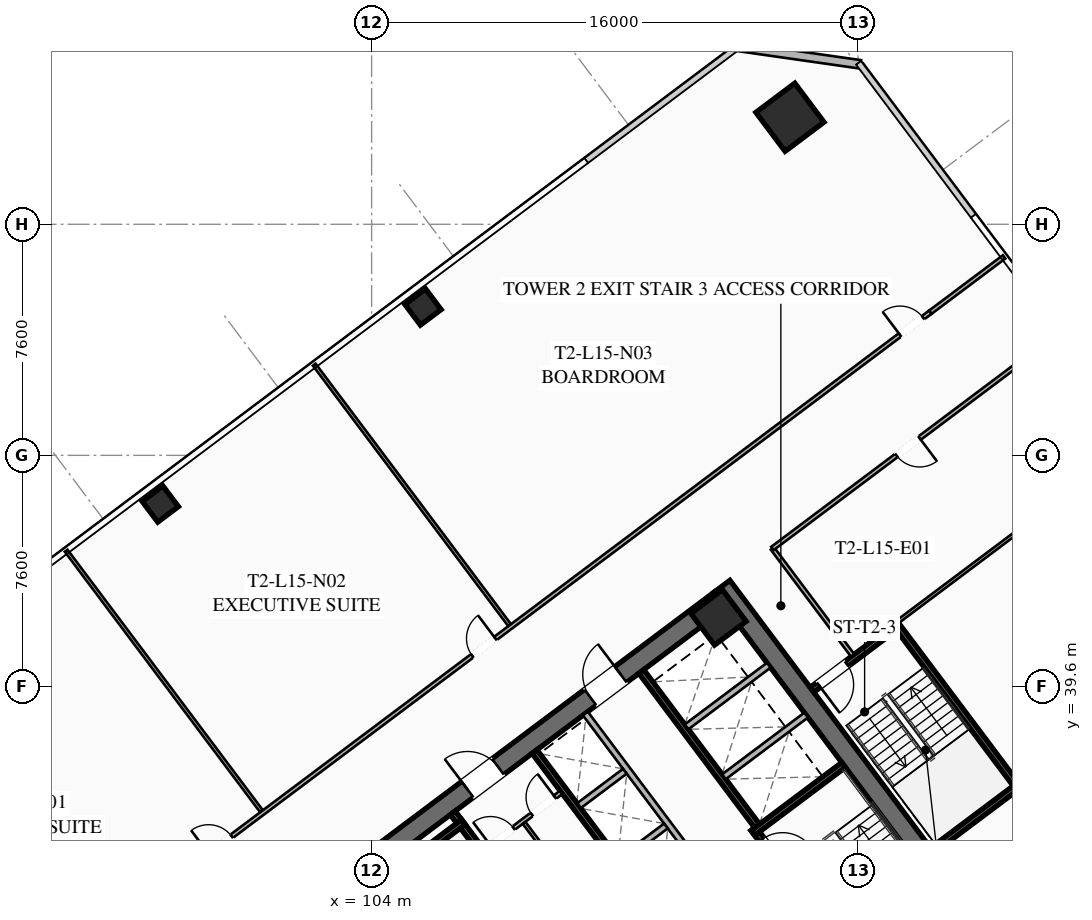
"""IFC4 building model, lengths in metres.
Left out: names, types, materials, properties, quantities, classifications, styles, units other than length and angle.
Written with IfcOpenShell. Run it as: python <this file> out.ifc"""

import sys

from ifc_helpers import new_model, si_unit, direction, frame, frame_2d, origin, origin_2d, place, context, subcontext, project, spatial, rectangle, hollow_rectangle, extrude, element, fill, save


model = new_model("IFC4")
c1 = context("Model", 3, precision=1e-05, world=origin(), true_north=direction((0.0, 1.0)))
c2 = subcontext(c1, "Body", "Model", "MODEL_VIEW")
j1 = project(units=[si_unit("LENGTHUNIT", "METRE"), si_unit("PLANEANGLEUNIT", "RADIAN")], contexts=[c1])
p1 = place(None, origin())
s1 = spatial("IfcSite", under=j1, at=p1, CompositionType="ELEMENT")
p2 = place(p1, origin())
s2 = spatial("IfcBuilding", under=s1, at=p2, CompositionType="ELEMENT")
p3 = place(p2, frame((0.0, 0.0, 60.1)))
s3 = spatial("IfcBuildingStorey", under=s2, at=p3, CompositionType="ELEMENT", Elevation=60.1)
p4 = place(p3, frame((115.524, 42.893, 0.0), z_axis=(0.0, 0.0, 1.0), x_axis=(0.600005007985, -0.799996243986, 0.0)))
e1 = element("IfcWall", 1, at=p4, inside=s3, PredefinedType="SHEAR", context=c2, shape_type="SweptSolid", body=[
    extrude(rectangle(XDim=15.6, YDim=0.65, at=frame_2d((7.8, 0.0))), origin(), (0.0, 0.0, 1.0), 3.55),
])
p5 = place(p3, frame((103.571, 33.522, 0.0), z_axis=(0.0, 0.0, 1.0), x_axis=(0.799998028465, 0.600002628705, 0.0)))
e2 = element("IfcWall", 2, at=p5, inside=s3, PredefinedType="SHEAR", context=c2, shape_type="SweptSolid", body=[
    extrude(rectangle(XDim=14.86, YDim=0.65, at=frame_2d((7.43, 0.0))), origin(), (0.0, 0.0, 1.0), 3.55),
])
p6 = place(p5, frame((4.48, 0.0, 0.0)))
e3 = element("IfcOpeningElement", 3, at=p6, cuts=e2, PredefinedType="OPENING", context=c2, shape_type="SweptSolid", body=[
    extrude(rectangle(XDim=1.25, YDim=2.25, at=frame_2d((0.625, 1.125))), frame((0.0, 0.335, 0.0), z_axis=(0.0, -1.0, 0.0), x_axis=(1.0, 0.0, 0.0)), (0.0, 0.0, 1.0), 0.67),
])
p7 = place(p5, frame((9.53, 0.0, 0.0)))
e4 = element("IfcOpeningElement", 4, at=p7, cuts=e2, PredefinedType="OPENING", context=c2, shape_type="SweptSolid", body=[
    extrude(rectangle(XDim=1.25, YDim=2.25, at=frame_2d((0.625, 1.125))), frame((0.0, 0.335, 0.0), z_axis=(0.0, -1.0, 0.0), x_axis=(1.0, 0.0, 0.0)), (0.0, 0.0, 1.0), 0.67),
])
p8 = place(p3, frame((115.41, 41.87, 0.0), z_axis=(0.0, 0.0, 1.0), x_axis=(0.799999996291, 0.600000004945, 0.0)))
e5 = element("IfcColumn", 5, at=p8, inside=s3, PredefinedType="COLUMN", context=c2, shape_type="SweptSolid", body=[
    extrude(hollow_rectangle(XDim=1.3, YDim=1.3, WallThickness=0.05, at=origin_2d()), origin(), (0.0, 0.0, 1.0), 3.35),
])
p9 = place(p3, frame((117.76, 58.32, 0.0), z_axis=(0.0, 0.0, 1.0), x_axis=(0.799999996291, 0.600000004945, 0.0)))
e6 = element("IfcColumn", 6, at=p9, inside=s3, PredefinedType="COLUMN", context=c2, shape_type="SweptSolid", body=[
    extrude(hollow_rectangle(XDim=1.6, YDim=1.6, WallThickness=0.06, at=origin_2d()), origin(), (0.0, 0.0, 1.0), 3.35),
])
for number, where, z_axis, x_axis in (
    (7, (105.69, 52.08, 0.0), (0.0, 0.0, 1.0), (0.8, 0.6, 0.0)),
    (8, (97.05, 45.6, 0.0), (0.0, 0.0, 1.0), (0.8, 0.6, 0.0)),
):
    element("IfcColumn", number, at=place(p3, frame(where, z_axis=z_axis, x_axis=x_axis)), inside=s3, PredefinedType="COLUMN", context=c2, shape_type="SweptSolid", body=[
        extrude(hollow_rectangle(XDim=0.85, YDim=0.85, WallThickness=0.035, at=origin_2d()), origin(), (0.0, 0.0, 1.0), 3.35),
    ])
p10 = place(p3, frame((116.02, 60.64, 0.0), z_axis=(0.0, 0.0, 1.0), x_axis=(0.989955445613, -0.14137968631, 0.0)))
e9 = element("IfcWall", 9, at=p10, inside=s3, PredefinedType="SOLIDWALL", context=c2, shape_type="SweptSolid", body=[
    extrude(rectangle(XDim=4.101, YDim=0.28, at=frame_2d((2.051, 0.0))), origin(), (0.0, 0.0, 1.0), 3.35),
])
p11 = place(p3, frame((111.44, 29.08, 0.0), z_axis=(0.0, 0.0, 1.0), x_axis=(-0.600009827119, 0.799992629566, 0.0)))
e10 = element("IfcWall", 10, at=p11, inside=s3, PredefinedType="SHEAR", context=c2, shape_type="SweptSolid", body=[
    extrude(rectangle(XDim=7.95, YDim=0.2, at=frame_2d((3.975, 0.0))), origin(), (0.0, 0.0, 1.0), 3.35),
])
p12 = place(p11, frame((0.45, 0.0, 0.0)))
e11 = element("IfcOpeningElement", 11, at=p12, cuts=e10, PredefinedType="OPENING", context=c2, shape_type="SweptSolid", body=[
    extrude(rectangle(XDim=1.15, YDim=2.2, at=frame_2d((0.575, 1.1))), frame((0.0, 0.11, 0.0), z_axis=(0.0, -1.0, 0.0), x_axis=(1.0, 0.0, 0.0)), (0.0, 0.0, 1.0), 0.22),
])
p13 = place(p3, frame((104.036, 32.902, 0.0), z_axis=(0.0, 0.0, 1.0), x_axis=(0.800039270442, 0.59994763584, 0.0)))
e12 = element("IfcWall", 12, at=p13, inside=s3, PredefinedType="SHEAR", context=c2, shape_type="SweptSolid", body=[
    extrude(rectangle(XDim=3.73, YDim=0.2, at=frame_2d((1.865, 0.0))), origin(), (0.0, 0.0, 1.0), 3.35),
])
p14 = place(p3, frame((116.56, 34.92, 0.0), z_axis=(0.0, 0.0, 1.0), x_axis=(0.600009827119, -0.799992629566, 0.0)))
e13 = element("IfcWall", 13, at=p14, inside=s3, PredefinedType="SHEAR", context=c2, shape_type="SweptSolid", body=[
    extrude(rectangle(XDim=7.95, YDim=0.2, at=frame_2d((3.975, 0.0))), origin(), (0.0, 0.0, 1.0), 3.35),
])
p15 = place(p14, frame((0.45, 0.0, 0.0)))
e14 = element("IfcOpeningElement", 14, at=p15, cuts=e13, PredefinedType="OPENING", context=c2, shape_type="SweptSolid", body=[
    extrude(rectangle(XDim=1.15, YDim=2.2, at=frame_2d((0.575, 1.1))), frame((0.0, 0.11, 0.0), z_axis=(0.0, -1.0, 0.0), x_axis=(1.0, 0.0, 0.0)), (0.0, 0.0, 1.0), 0.22),
])
p16 = place(p3, frame((116.54, 34.78, 0.0), z_axis=(0.0, 0.0, 1.0), x_axis=(0.799984290658, 0.600020945218, 0.0)))
e15 = element("IfcWall", 15, at=p16, inside=s3, PredefinedType="SHEAR", context=c2, shape_type="SweptSolid", body=[
    extrude(rectangle(XDim=3.73, YDim=0.2, at=frame_2d((1.865, 0.0))), origin(), (0.0, 0.0, 1.0), 3.35),
])
p17 = place(p3, frame((117.938, 26.016, 0.0), z_axis=(0.0, 0.0, 1.0), x_axis=(-0.600005463273, 0.799995902516, 0.0)))
e16 = element("IfcWall", 16, at=p17, inside=s3, PredefinedType="SHEAR", context=c2, shape_type="SweptSolid", body=[
    extrude(rectangle(XDim=14.3, YDim=0.2, at=frame_2d((7.15, 0.0))), origin(), (0.0, 0.0, 1.0), 3.35),
])
p18 = place(p3, frame((112.87, 40.09, 0.0), z_axis=(0.0, 0.0, 1.0), x_axis=(0.599975393228, -0.800018454488, 0.0)))
e17 = element("IfcWall", 17, at=p18, inside=s3, PredefinedType="SHEAR", context=c2, shape_type="SweptSolid", body=[
    extrude(rectangle(XDim=6.35, YDim=0.2, at=frame_2d((3.175, 0.0))), origin(), (0.0, 0.0, 1.0), 3.35),
])
for number, where, z_axis, x_axis in (
    (18, (115.59, 36.63, 0.0), (0.0, 0.0, 1.0), (0.8, 0.6, 0.0)),
    (19, (114.36, 38.27, 0.0), (0.0, 0.0, 1.0), (0.8, 0.6, 0.0)),
):
    element("IfcWall", number, at=place(p3, frame(where, z_axis=z_axis, x_axis=x_axis)), inside=s3, PredefinedType="SOLIDWALL", context=c2, shape_type="SweptSolid", body=[
        extrude(rectangle(XDim=3.38, YDim=0.2, at=frame_2d((1.69, 0.0))), origin(), (0.0, 0.0, 1.0), 3.35),
    ])
p19 = place(p3, frame((107.71, 34.22, 0.0), z_axis=(0.0, 0.0, 1.0), x_axis=(0.799981399002, 0.60002480053, 0.0)))
e20 = element("IfcWall", 20, at=p19, inside=s3, PredefinedType="PARTITIONING", context=c2, shape_type="SweptSolid", body=[
    extrude(rectangle(XDim=3.15, YDim=0.135, at=frame_2d((1.575, 0.0))), origin(), (0.0, 0.0, 1.0), 2.703),
])
p20 = place(p19, frame((0.25, 0.0, 0.0)))
e21 = element("IfcOpeningElement", 21, at=p20, cuts=e20, PredefinedType="OPENING", context=c2, shape_type="SweptSolid", body=[
    extrude(rectangle(XDim=0.95, YDim=2.05, at=frame_2d((0.475, 1.025))), frame((0.0, 0.077, 0.0), z_axis=(0.0, -1.0, 0.0), x_axis=(1.0, 0.0, 0.0)), (0.0, 0.0, 1.0), 0.155),
])
p21 = place(p19, frame((1.95, 0.0, 0.0)))
e22 = element("IfcOpeningElement", 22, at=p21, cuts=e20, PredefinedType="OPENING", context=c2, shape_type="SweptSolid", body=[
    extrude(rectangle(XDim=0.95, YDim=2.05, at=frame_2d((0.475, 1.025))), frame((0.0, 0.077, 0.0), z_axis=(0.0, -1.0, 0.0), x_axis=(1.0, 0.0, 0.0)), (0.0, 0.0, 1.0), 0.155),
])
p22 = place(p3, frame((111.296, 32.072, 0.0), z_axis=(0.0, 0.0, 1.0), x_axis=(-0.59995887973, 0.800030838552, 0.0)))
e23 = element("IfcWall", 23, at=p22, inside=s3, PredefinedType="PARTITIONING", context=c2, shape_type="SweptSolid", body=[
    extrude(rectangle(XDim=3.8, YDim=0.11, at=frame_2d((1.9, 0.0))), origin(), (0.0, 0.0, 1.0), 2.703),
])
p23 = place(p3, frame((108.91, 32.62, 0.0), z_axis=(0.0, 0.0, 1.0), x_axis=(0.800018601094, 0.59997519774, 0.0)))
e24 = element("IfcWall", 24, at=p23, inside=s3, PredefinedType="PARTITIONING", context=c2, shape_type="SweptSolid", body=[
    extrude(rectangle(XDim=3.15, YDim=0.11, at=frame_2d((1.575, 0.0))), origin(), (0.0, 0.0, 1.0), 2.703),
])
p24 = place(p3, frame((115.11, 33.27, 0.0), z_axis=(0.0, 0.0, 1.0), x_axis=(-0.600011488909, 0.79999138319, 0.0)))
e25 = element("IfcWall", 25, at=p24, inside=s3, PredefinedType="SOLIDWALL", context=c2, shape_type="SweptSolid", body=[
    extrude(rectangle(XDim=6.8, YDim=0.2, at=frame_2d((3.4, 0.0))), origin(), (0.0, 0.0, 1.0), 3.35),
])
p25 = place(p3, frame((112.176, 33.882, 0.0), z_axis=(0.0, 0.0, 1.0), x_axis=(0.8, 0.6, 0.0)))
e26 = element("IfcWall", 26, at=p25, inside=s3, PredefinedType="SOLIDWALL", context=c2, shape_type="SweptSolid", body=[
    extrude(rectangle(XDim=1.88, YDim=0.2, at=frame_2d((0.94, 0.0))), origin(), (0.0, 0.0, 1.0), 3.35),
])
p26 = place(p3, frame((110.826, 35.682, 0.0), z_axis=(0.0, 0.0, 1.0), x_axis=(0.799984418148, 0.600020775241, 0.0)))
e27 = element("IfcWall", 27, at=p26, inside=s3, PredefinedType="SOLIDWALL", context=c2, shape_type="SweptSolid", body=[
    extrude(rectangle(XDim=1.88, YDim=0.2, at=frame_2d((0.94, 0.0))), origin(), (0.0, 0.0, 1.0), 3.35),
])
p27 = place(p3, frame((125.304, 36.228, 0.0), z_axis=(0.0, 0.0, 1.0), x_axis=(-0.59998851072, 0.800008616831, 0.0)))
e28 = element("IfcWall", 28, at=p27, inside=s3, PredefinedType="SHEAR", context=c2, shape_type="SweptSolid", body=[
    extrude(rectangle(XDim=6.8, YDim=0.2, at=frame_2d((3.4, 0.0))), origin(), (0.0, 0.0, 1.0), 3.35),
])
p28 = place(p3, frame((121.204, 41.528, 0.0), z_axis=(0.0, 0.0, 1.0), x_axis=(-0.800017232136, -0.599977023131, 0.0)))
e29 = element("IfcWall", 29, at=p28, inside=s3, PredefinedType="SHEAR", context=c2, shape_type="SweptSolid", body=[
    extrude(rectangle(XDim=3.4, YDim=0.2, at=frame_2d((1.7, 0.0))), origin(), (0.0, 0.0, 1.0), 3.35),
])
p29 = place(p28, frame((1.975, 0.0, 0.0)))
e30 = element("IfcOpeningElement", 30, at=p29, cuts=e29, PredefinedType="OPENING", context=c2, shape_type="SweptSolid", body=[
    extrude(rectangle(XDim=1.15, YDim=2.2, at=frame_2d((0.575, 1.1))), frame((0.0, 0.11, 0.0), z_axis=(0.0, -1.0, 0.0), x_axis=(1.0, 0.0, 0.0)), (0.0, 0.0, 1.0), 0.22),
])
p30 = place(p3, frame((122.444, 34.208, 0.0), z_axis=(0.0, 0.0, 1.0), x_axis=(0.79999138319, 0.600011488909, 0.0)))
e31 = element("IfcWall", 31, at=p30, inside=s3, PredefinedType="SHEAR", context=c2, shape_type="SweptSolid", body=[
    extrude(rectangle(XDim=3.4, YDim=0.2, at=frame_2d((1.7, 0.0))), origin(), (0.0, 0.0, 1.0), 3.35),
])
p31 = place(p3, frame((119.824, 40.618, 0.0), z_axis=(0.0, 0.0, 1.0), x_axis=(-0.599982243973, 0.800013316712, 0.0)))
e32 = element("IfcWall", 32, at=p31, inside=s3, PredefinedType="PARTITIONING", context=c2, shape_type="SweptSolid", body=[
    extrude(rectangle(XDim=4.4, YDim=0.135, at=frame_2d((2.2, 0.0))), origin(), (0.0, 0.0, 1.0), 2.703),
])
p32 = place(p3, frame((98.396, 33.922, 0.0), z_axis=(0.0, 0.0, 1.0), x_axis=(0.800001954438, 0.599997394074, 0.0)))
e33 = element("IfcWall", 33, at=p32, inside=s3, PredefinedType="PARTITIONING", context=c2, shape_type="SweptSolid", body=[
    extrude(rectangle(XDim=29.98, YDim=0.135, at=frame_2d((14.99, 0.0))), origin(), (0.0, 0.0, 1.0), 2.703),
])
p33 = place(p32, frame((0.3, 0.0, 0.0)))
e34 = element("IfcOpeningElement", 34, at=p33, cuts=e33, PredefinedType="OPENING", context=c2, shape_type="SweptSolid", body=[
    extrude(rectangle(XDim=0.95, YDim=2.05, at=frame_2d((0.475, 1.025))), frame((0.0, 0.077, 0.0), z_axis=(0.0, -1.0, 0.0), x_axis=(1.0, 0.0, 0.0)), (0.0, 0.0, 1.0), 0.155),
])
p34 = place(p32, frame((11.143, 0.0, 0.0)))
e35 = element("IfcOpeningElement", 35, at=p34, cuts=e33, PredefinedType="OPENING", context=c2, shape_type="SweptSolid", body=[
    extrude(rectangle(XDim=0.95, YDim=2.05, at=frame_2d((0.475, 1.025))), frame((0.0, 0.077, 0.0), z_axis=(0.0, -1.0, 0.0), x_axis=(1.0, 0.0, 0.0)), (0.0, 0.0, 1.0), 0.155),
])
p35 = place(p32, frame((28.73, 0.0, 0.0)))
e36 = element("IfcOpeningElement", 36, at=p35, cuts=e33, PredefinedType="OPENING", context=c2, shape_type="SweptSolid", body=[
    extrude(rectangle(XDim=0.95, YDim=2.05, at=frame_2d((0.475, 1.025))), frame((0.0, 0.077, 0.0), z_axis=(0.0, -1.0, 0.0), x_axis=(1.0, 0.0, 0.0)), (0.0, 0.0, 1.0), 0.155),
])
p36 = place(p3, frame((122.38, 51.91, 0.0), z_axis=(0.0, 0.0, 1.0), x_axis=(0.799990331366, 0.600012891296, 0.0)))
e37 = element("IfcWall", 37, at=p36, inside=s3, PredefinedType="PARTITIONING", context=c2, shape_type="SweptSolid", body=[
    extrude(rectangle(XDim=3.03, YDim=0.135, at=frame_2d((1.515, 0.0))), origin(), (0.0, 0.0, 1.0), 2.703),
])
p37 = place(p3, frame((100.372, 35.504, 0.0), z_axis=(0.0, 0.0, 1.0), x_axis=(-0.600007301277, 0.79999452399, 0.0)))
e38 = element("IfcWall", 38, at=p37, inside=s3, PredefinedType="PARTITIONING", context=c2, shape_type="SweptSolid", body=[
    extrude(rectangle(XDim=10.7, YDim=0.11, at=frame_2d((5.35, 0.0))), origin(), (0.0, 0.0, 1.0), 2.703),
])
p38 = place(p3, frame((108.532, 41.624, 0.0), z_axis=(0.0, 0.0, 1.0), x_axis=(-0.599992698573, 0.800005476018, 0.0)))
e39 = element("IfcWall", 39, at=p38, inside=s3, PredefinedType="PARTITIONING", context=c2, shape_type="SweptSolid", body=[
    extrude(rectangle(XDim=10.7, YDim=0.11, at=frame_2d((5.35, 0.0))), origin(), (0.0, 0.0, 1.0), 2.703),
])
p39 = place(p3, frame((126.664, 51.248, 0.0), z_axis=(0.0, 0.0, 1.0), x_axis=(-0.799995055373, -0.600006592779, 0.0)))
e40 = element("IfcWall", 40, at=p39, inside=s3, PredefinedType="PARTITIONING", context=c2, shape_type="SweptSolid", body=[
    extrude(rectangle(XDim=11.85, YDim=0.135, at=frame_2d((5.925, 0.0))), origin(), (0.0, 0.0, 1.0), 2.703),
])
p40 = place(p39, frame((5.8, 0.0, 0.0)))
e41 = element("IfcOpeningElement", 41, at=p40, cuts=e40, PredefinedType="OPENING", context=c2, shape_type="SweptSolid", body=[
    extrude(rectangle(XDim=0.95, YDim=2.05, at=frame_2d((0.475, 1.025))), frame((0.0, 0.077, 0.0), z_axis=(0.0, -1.0, 0.0), x_axis=(1.0, 0.0, 0.0)), (0.0, 0.0, 1.0), 0.155),
])
p41 = place(p3, frame((129.304, 47.728, 0.0), z_axis=(0.0, 0.0, 1.0), x_axis=(-0.8, -0.6, 0.0)))
e42 = element("IfcWall", 42, at=p41, inside=s3, PredefinedType="PARTITIONING", context=c2, shape_type="SweptSolid", body=[
    extrude(rectangle(XDim=10.0, YDim=0.11, at=frame_2d((5.0, 0.0))), origin(), (0.0, 0.0, 1.0), 2.703),
])
p42 = place(p6, origin())
e43 = element("IfcDoor", 43, at=p42, inside=s3, OperationType="SINGLE_SWING_LEFT", PredefinedType="DOOR", context=c2, shape_type="SweptSolid", body=[
    extrude(rectangle(XDim=1.25, YDim=2.25, at=frame_2d((0.625, 1.125))), frame((0.0, 0.025, 0.0), z_axis=(0.0, -1.0, 0.0), x_axis=(1.0, 0.0, 0.0)), (0.0, 0.0, 1.0), 0.05),
])
fill(e3, e43)
p43 = place(p7, origin())
e44 = element("IfcDoor", 44, at=p43, inside=s3, OperationType="SINGLE_SWING_RIGHT", PredefinedType="DOOR", context=c2, shape_type="SweptSolid", body=[
    extrude(rectangle(XDim=1.25, YDim=2.25, at=frame_2d((0.625, 1.125))), frame((0.0, 0.025, 0.0), z_axis=(0.0, -1.0, 0.0), x_axis=(1.0, 0.0, 0.0)), (0.0, 0.0, 1.0), 0.05),
])
fill(e4, e44)
p44 = place(p15, origin())
e45 = element("IfcDoor", 45, at=p44, inside=s3, OperationType="SINGLE_SWING_RIGHT", PredefinedType="DOOR", context=c2, shape_type="SweptSolid", body=[
    extrude(rectangle(XDim=1.15, YDim=2.2, at=frame_2d((0.575, 1.1))), frame((0.0, 0.025, 0.0), z_axis=(0.0, -1.0, 0.0), x_axis=(1.0, 0.0, 0.0)), (0.0, 0.0, 1.0), 0.05),
])
fill(e14, e45)
p45 = place(p20, origin())
e46 = element("IfcDoor", 46, at=p45, inside=s3, OperationType="SINGLE_SWING_LEFT", PredefinedType="DOOR", context=c2, shape_type="SweptSolid", body=[
    extrude(rectangle(XDim=0.95, YDim=2.05, at=frame_2d((0.475, 1.025))), frame((0.0, 0.025, 0.0), z_axis=(0.0, -1.0, 0.0), x_axis=(1.0, 0.0, 0.0)), (0.0, 0.0, 1.0), 0.05),
])
fill(e21, e46)
p46 = place(p21, origin())
e47 = element("IfcDoor", 47, at=p46, inside=s3, OperationType="SINGLE_SWING_RIGHT", PredefinedType="DOOR", context=c2, shape_type="SweptSolid", body=[
    extrude(rectangle(XDim=0.95, YDim=2.05, at=frame_2d((0.475, 1.025))), frame((0.0, 0.025, 0.0), z_axis=(0.0, -1.0, 0.0), x_axis=(1.0, 0.0, 0.0)), (0.0, 0.0, 1.0), 0.05),
])
fill(e22, e47)
p47 = place(p29, origin())
e48 = element("IfcDoor", 48, at=p47, inside=s3, OperationType="SINGLE_SWING_RIGHT", PredefinedType="DOOR", context=c2, shape_type="SweptSolid", body=[
    extrude(rectangle(XDim=1.15, YDim=2.2, at=frame_2d((0.575, 1.1))), frame((0.0, 0.025, 0.0), z_axis=(0.0, -1.0, 0.0), x_axis=(1.0, 0.0, 0.0)), (0.0, 0.0, 1.0), 0.05),
])
fill(e30, e48)
p48 = place(p33, origin())
e49 = element("IfcDoor", 49, at=p48, inside=s3, OperationType="SINGLE_SWING_LEFT", PredefinedType="DOOR", context=c2, shape_type="SweptSolid", body=[
    extrude(rectangle(XDim=0.95, YDim=2.05, at=frame_2d((0.475, 1.025))), frame((0.0, 0.025, 0.0), z_axis=(0.0, -1.0, 0.0), x_axis=(1.0, 0.0, 0.0)), (0.0, 0.0, 1.0), 0.05),
])
fill(e34, e49)
p49 = place(p34, origin())
e50 = element("IfcDoor", 50, at=p49, inside=s3, OperationType="SINGLE_SWING_RIGHT", PredefinedType="DOOR", context=c2, shape_type="SweptSolid", body=[
    extrude(rectangle(XDim=0.95, YDim=2.05, at=frame_2d((0.475, 1.025))), frame((0.0, 0.025, 0.0), z_axis=(0.0, -1.0, 0.0), x_axis=(1.0, 0.0, 0.0)), (0.0, 0.0, 1.0), 0.05),
])
fill(e35, e50)
p50 = place(p35, origin())
e51 = element("IfcDoor", 51, at=p50, inside=s3, OperationType="SINGLE_SWING_LEFT", PredefinedType="DOOR", context=c2, shape_type="SweptSolid", body=[
    extrude(rectangle(XDim=0.95, YDim=2.05, at=frame_2d((0.475, 1.025))), frame((0.0, 0.025, 0.0), z_axis=(0.0, -1.0, 0.0), x_axis=(1.0, 0.0, 0.0)), (0.0, 0.0, 1.0), 0.05),
])
fill(e36, e51)
p51 = place(p40, origin())
e52 = element("IfcDoor", 52, at=p51, inside=s3, OperationType="SINGLE_SWING_LEFT", PredefinedType="DOOR", context=c2, shape_type="SweptSolid", body=[
    extrude(rectangle(XDim=0.95, YDim=2.05, at=frame_2d((0.475, 1.025))), frame((0.0, 0.025, 0.0), z_axis=(0.0, -1.0, 0.0), x_axis=(1.0, 0.0, 0.0)), (0.0, 0.0, 1.0), 0.05),
])
fill(e41, e52)
save(model, sys.argv[1])
